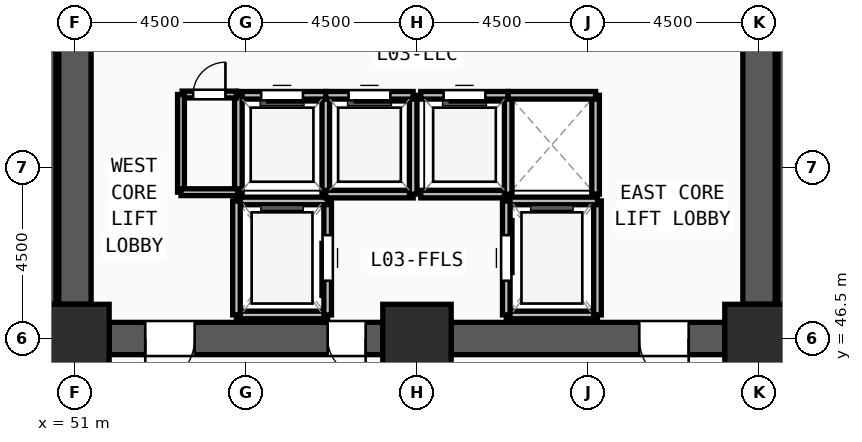
"""IFC4 building model, lengths in metres.
Left out: names, types, materials, properties, quantities, classifications, styles, units other than length and angle.
Written with IfcOpenShell. Run it as: python <this file> out.ifc"""

import sys

from ifc_helpers import new_model, si_unit, direction, frame, frame_2d, origin, origin_2d, place, context, subcontext, project, spatial, rectangle, extrude, source, transform, mapped, element, fill, save


model = new_model("IFC4")
c1 = context("Model", 3, precision=1e-05, world=origin(), true_north=direction((0.0, 1.0)))
c2 = subcontext(c1, "Body", "Model", "MODEL_VIEW")
j1 = project(units=[si_unit("LENGTHUNIT", "METRE"), si_unit("PLANEANGLEUNIT", "RADIAN")], contexts=[c1])
p1 = place(None, origin())
s1 = spatial("IfcSite", under=j1, at=p1, CompositionType="ELEMENT")
p2 = place(p1, origin())
s2 = spatial("IfcBuilding", under=s1, at=p2, CompositionType="ELEMENT")
p3 = place(p2, frame((0.0, 0.0, 9.9)))
s3 = spatial("IfcBuildingStorey", under=s2, at=p3, CompositionType="ELEMENT", Elevation=9.9)
m1 = source(origin(), c2, "Body", "SweptSolid", [
    extrude(rectangle(XDim=1.8, YDim=1.8, at=origin_2d()), origin(), (0.0, 0.0, 1.0), 4.5),
])
for number, where, z_axis, x_axis in (
    (1, (51.0, 46.5, 0.0), (0.0, 0.0, 1.0), (1.0, 0.0, 0.0)),
    (2, (60.0, 46.5, 0.0), (0.0, 0.0, 1.0), (1.0, 0.0, 0.0)),
    (3, (69.0, 46.5, 0.0), (0.0, 0.0, 1.0), (1.0, 0.0, 0.0)),
):
    element("IfcColumn", number, at=place(p3, frame(where, z_axis=z_axis, x_axis=x_axis)), inside=s3, PredefinedType="COLUMN", context=c2, shape_type="MappedRepresentation", body=[
        mapped(m1, transform((0.0, 0.0, 0.0), x_axis=(1.0, 0.0, 0.0), y_axis=(0.0, 1.0, 0.0), z_axis=(0.0, 0.0, 1.0), scale=1.0)),
    ])
p4 = place(p3, frame((69.0, 60.6, 0.0), z_axis=(0.0, 0.0, 1.0), x_axis=(0.0, -1.0, 0.0)))
e4 = element("IfcWall", 4, at=p4, inside=s3, PredefinedType="SHEAR", context=c2, shape_type="SweptSolid", body=[
    extrude(rectangle(XDim=13.2, YDim=0.85, at=frame_2d((6.6, 0.0))), origin(), (0.0, 0.0, 1.0), 4.25),
])
m2 = source(origin(), c2, "Body", "SweptSolid", [
    extrude(rectangle(XDim=1.2, YDim=2.2, at=frame_2d((0.6, 1.1))), frame((0.0, 0.435, 0.0), z_axis=(0.0, -1.0, 0.0), x_axis=(1.0, 0.0, 0.0)), (0.0, 0.0, 1.0), 0.87),
])
p5 = place(p4, frame((1.05, 0.0, 0.0)))
e5 = element("IfcOpeningElement", 5, at=p5, cuts=e4, PredefinedType="OPENING", context=c2, shape_type="MappedRepresentation", body=[
    mapped(m2, transform((0.0, 0.0, 0.0), x_axis=(1.0, 0.0, 0.0), y_axis=(0.0, 1.0, 0.0), z_axis=(0.0, 0.0, 1.0), scale=1.0)),
])
p6 = place(p3, frame((68.1, 46.5, 0.0), z_axis=(0.0, 0.0, 1.0), x_axis=(-1.0, 0.0, 0.0)))
e6 = element("IfcWall", 6, at=p6, inside=s3, PredefinedType="SHEAR", context=c2, shape_type="SweptSolid", body=[
    extrude(rectangle(XDim=7.2, YDim=0.85, at=frame_2d((3.6, 0.0))), origin(), (0.0, 0.0, 1.0), 4.25),
])
m3 = source(origin(), c2, "Body", "SweptSolid", [
    extrude(rectangle(XDim=1.3, YDim=2.2, at=frame_2d((0.65, 1.1))), frame((0.0, 0.435, 0.0), z_axis=(0.0, -1.0, 0.0), x_axis=(1.0, 0.0, 0.0)), (0.0, 0.0, 1.0), 0.87),
])
p7 = place(p6, frame((0.95, 0.0, 0.0)))
e7 = element("IfcOpeningElement", 7, at=p7, cuts=e6, PredefinedType="OPENING", context=c2, shape_type="MappedRepresentation", body=[
    mapped(m3, transform((0.0, 0.0, 0.0), x_axis=(1.0, 0.0, 0.0), y_axis=(0.0, 1.0, 0.0), z_axis=(0.0, 0.0, 1.0), scale=1.0)),
])
p8 = place(p3, frame((59.1, 46.5, 0.0), z_axis=(0.0, 0.0, 1.0), x_axis=(-1.0, 0.0, 0.0)))
e8 = element("IfcWall", 8, at=p8, inside=s3, PredefinedType="SHEAR", context=c2, shape_type="SweptSolid", body=[
    extrude(rectangle(XDim=7.2, YDim=0.85, at=frame_2d((3.6, 0.0))), origin(), (0.0, 0.0, 1.0), 4.25),
])
p9 = place(p8, frame((4.95, 0.0, 0.0)))
e9 = element("IfcOpeningElement", 9, at=p9, cuts=e8, PredefinedType="OPENING", context=c2, shape_type="MappedRepresentation", body=[
    mapped(m3, transform((0.0, 0.0, 0.0), x_axis=(1.0, 0.0, 0.0), y_axis=(0.0, 1.0, 0.0), z_axis=(0.0, 0.0, 1.0), scale=1.0)),
])
m4 = source(origin(), c2, "Body", "SweptSolid", [
    extrude(rectangle(XDim=1.0, YDim=2.2, at=frame_2d((0.5, 1.1))), frame((0.0, 0.435, 0.0), z_axis=(0.0, -1.0, 0.0), x_axis=(1.0, 0.0, 0.0)), (0.0, 0.0, 1.0), 0.87),
])
p10 = place(p8, frame((0.45, 0.0, 0.0)))
e10 = element("IfcOpeningElement", 10, at=p10, cuts=e8, PredefinedType="OPENING", context=c2, shape_type="MappedRepresentation", body=[
    mapped(m4, transform((0.0, 0.0, 0.0), x_axis=(1.0, 0.0, 0.0), y_axis=(0.0, 1.0, 0.0), z_axis=(0.0, 0.0, 1.0), scale=1.0)),
])
p11 = place(p3, frame((51.0, 47.4, 0.0), z_axis=(0.0, 0.0, 1.0), x_axis=(0.0, 1.0, 0.0)))
e11 = element("IfcWall", 11, at=p11, inside=s3, PredefinedType="SHEAR", context=c2, shape_type="SweptSolid", body=[
    extrude(rectangle(XDim=13.2, YDim=0.85, at=frame_2d((6.6, 0.0))), origin(), (0.0, 0.0, 1.0), 4.25),
])
for number, where, z_axis, x_axis in (
    (12, (50.38, 46.7, 0.0), (0.0, 0.0, 1.0), (0.0, 1.0, 0.0)),
    (13, (69.62, 54.52, 0.0), (0.0, 0.0, 1.0), (0.0, -1.0, 0.0)),
):
    element("IfcWall", number, at=place(p3, frame(where, z_axis=z_axis, x_axis=x_axis)), inside=s3, PredefinedType="SOLIDWALL", context=c2, shape_type="SweptSolid", body=[
        extrude(rectangle(XDim=7.82, YDim=0.24, at=frame_2d((3.91, 0.0))), origin(), (0.0, 0.0, 1.0), 4.25),
    ])
p12 = place(p3, frame((55.25, 47.12, 0.0), z_axis=(0.0, 0.0, 1.0), x_axis=(1.0, 0.0, 0.0)))
e14 = element("IfcWall", 14, at=p12, inside=s3, PredefinedType="SOLIDWALL", context=c2, shape_type="SweptSolid", body=[
    extrude(rectangle(XDim=2.4, YDim=0.2, at=frame_2d((1.2, 0.0))), origin(), (0.0, 0.0, 1.0), 4.25),
])
p13 = place(p3, frame((57.65, 47.12, 0.0), z_axis=(0.0, 0.0, 1.0), x_axis=(0.0, 1.0, 0.0)))
e15 = element("IfcWall", 15, at=p13, inside=s3, PredefinedType="SOLIDWALL", context=c2, shape_type="SweptSolid", body=[
    extrude(rectangle(XDim=3.0, YDim=0.2, at=frame_2d((1.5, 0.0))), origin(), (0.0, 0.0, 1.0), 4.25),
])
m5 = source(origin(), c2, "Body", "SweptSolid", [
    extrude(rectangle(XDim=1.2, YDim=2.3, at=frame_2d((0.6, 1.15))), frame((0.0, 0.11, 0.0), z_axis=(0.0, -1.0, 0.0), x_axis=(1.0, 0.0, 0.0)), (0.0, 0.0, 1.0), 0.22),
])
p14 = place(p13, frame((0.9, 0.0, 0.0)))
e16 = element("IfcOpeningElement", 16, at=p14, cuts=e15, PredefinedType="OPENING", context=c2, shape_type="MappedRepresentation", body=[
    mapped(m5, transform((0.0, 0.0, 0.0), x_axis=(1.0, 0.0, 0.0), y_axis=(0.0, 1.0, 0.0), z_axis=(0.0, 0.0, 1.0), scale=1.0)),
])
p15 = place(p3, frame((57.65, 50.12, 0.0), z_axis=(0.0, 0.0, 1.0), x_axis=(-1.0, 0.0, 0.0)))
e17 = element("IfcWall", 17, at=p15, inside=s3, PredefinedType="SOLIDWALL", context=c2, shape_type="SweptSolid", body=[
    extrude(rectangle(XDim=2.4, YDim=0.2, at=frame_2d((1.2, 0.0))), origin(), (0.0, 0.0, 1.0), 4.25),
])
p16 = place(p3, frame((55.25, 50.12, 0.0), z_axis=(0.0, 0.0, 1.0), x_axis=(0.0, -1.0, 0.0)))
e18 = element("IfcWall", 18, at=p16, inside=s3, PredefinedType="SOLIDWALL", context=c2, shape_type="SweptSolid", body=[
    extrude(rectangle(XDim=3.0, YDim=0.2, at=frame_2d((1.5, 0.0))), origin(), (0.0, 0.0, 1.0), 4.25),
])
p17 = place(p3, frame((62.35, 47.12, 0.0), z_axis=(0.0, 0.0, 1.0), x_axis=(1.0, 0.0, 0.0)))
e19 = element("IfcWall", 19, at=p17, inside=s3, PredefinedType="SOLIDWALL", context=c2, shape_type="SweptSolid", body=[
    extrude(rectangle(XDim=2.4, YDim=0.2, at=frame_2d((1.2, 0.0))), origin(), (0.0, 0.0, 1.0), 4.25),
])
p18 = place(p3, frame((64.75, 47.12, 0.0), z_axis=(0.0, 0.0, 1.0), x_axis=(0.0, 1.0, 0.0)))
e20 = element("IfcWall", 20, at=p18, inside=s3, PredefinedType="SOLIDWALL", context=c2, shape_type="SweptSolid", body=[
    extrude(rectangle(XDim=3.0, YDim=0.2, at=frame_2d((1.5, 0.0))), origin(), (0.0, 0.0, 1.0), 4.25),
])
p19 = place(p3, frame((64.75, 50.12, 0.0), z_axis=(0.0, 0.0, 1.0), x_axis=(-1.0, 0.0, 0.0)))
e21 = element("IfcWall", 21, at=p19, inside=s3, PredefinedType="SOLIDWALL", context=c2, shape_type="SweptSolid", body=[
    extrude(rectangle(XDim=2.4, YDim=0.2, at=frame_2d((1.2, 0.0))), origin(), (0.0, 0.0, 1.0), 4.25),
])
p20 = place(p3, frame((62.35, 50.12, 0.0), z_axis=(0.0, 0.0, 1.0), x_axis=(0.0, -1.0, 0.0)))
e22 = element("IfcWall", 22, at=p20, inside=s3, PredefinedType="SOLIDWALL", context=c2, shape_type="SweptSolid", body=[
    extrude(rectangle(XDim=3.0, YDim=0.2, at=frame_2d((1.5, 0.0))), origin(), (0.0, 0.0, 1.0), 4.25),
])
p21 = place(p20, frame((0.9, 0.0, 0.0)))
e23 = element("IfcOpeningElement", 23, at=p21, cuts=e22, PredefinedType="OPENING", context=c2, shape_type="MappedRepresentation", body=[
    mapped(m5, transform((0.0, 0.0, 0.0), x_axis=(1.0, 0.0, 0.0), y_axis=(0.0, 1.0, 0.0), z_axis=(0.0, 0.0, 1.0), scale=1.0)),
])
p22 = place(p3, frame((57.6, 50.3, 0.0), z_axis=(0.0, 0.0, 1.0), x_axis=(0.0, 1.0, 0.0)))
e24 = element("IfcWall", 24, at=p22, inside=s3, PredefinedType="SOLIDWALL", context=c2, shape_type="SweptSolid", body=[
    extrude(rectangle(XDim=2.6, YDim=0.2, at=frame_2d((1.3, 0.0))), origin(), (0.0, 0.0, 1.0), 4.25),
])
p23 = place(p3, frame((57.6, 52.9, 0.0), z_axis=(0.0, 0.0, 1.0), x_axis=(-1.0, 0.0, 0.0)))
e25 = element("IfcWall", 25, at=p23, inside=s3, PredefinedType="SOLIDWALL", context=c2, shape_type="SweptSolid", body=[
    extrude(rectangle(XDim=2.3, YDim=0.2, at=frame_2d((1.15, 0.0))), origin(), (0.0, 0.0, 1.0), 4.25),
])
m6 = source(origin(), c2, "Body", "SweptSolid", [
    extrude(rectangle(XDim=1.1, YDim=2.2, at=frame_2d((0.55, 1.1))), frame((0.0, 0.11, 0.0), z_axis=(0.0, -1.0, 0.0), x_axis=(1.0, 0.0, 0.0)), (0.0, 0.0, 1.0), 0.22),
])
p24 = place(p23, frame((0.6, 0.0, 0.0)))
e26 = element("IfcOpeningElement", 26, at=p24, cuts=e25, PredefinedType="OPENING", context=c2, shape_type="MappedRepresentation", body=[
    mapped(m6, transform((0.0, 0.0, 0.0), x_axis=(1.0, 0.0, 0.0), y_axis=(0.0, 1.0, 0.0), z_axis=(0.0, 0.0, 1.0), scale=1.0)),
])
p25 = place(p3, frame((55.3, 52.9, 0.0), z_axis=(0.0, 0.0, 1.0), x_axis=(0.0, -1.0, 0.0)))
e27 = element("IfcWall", 27, at=p25, inside=s3, PredefinedType="SOLIDWALL", context=c2, shape_type="SweptSolid", body=[
    extrude(rectangle(XDim=2.6, YDim=0.2, at=frame_2d((1.3, 0.0))), origin(), (0.0, 0.0, 1.0), 4.25),
])
p26 = place(p3, frame((57.6, 50.3, 0.0), z_axis=(0.0, 0.0, 1.0), x_axis=(1.0, 0.0, 0.0)))
e28 = element("IfcWall", 28, at=p26, inside=s3, PredefinedType="SOLIDWALL", context=c2, shape_type="SweptSolid", body=[
    extrude(rectangle(XDim=2.3, YDim=0.2, at=frame_2d((1.15, 0.0))), origin(), (0.0, 0.0, 1.0), 4.25),
])
p27 = place(p3, frame((59.9, 50.3, 0.0), z_axis=(0.0, 0.0, 1.0), x_axis=(0.0, 1.0, 0.0)))
e29 = element("IfcWall", 29, at=p27, inside=s3, PredefinedType="SOLIDWALL", context=c2, shape_type="SweptSolid", body=[
    extrude(rectangle(XDim=2.6, YDim=0.2, at=frame_2d((1.3, 0.0))), origin(), (0.0, 0.0, 1.0), 4.25),
])
p28 = place(p3, frame((59.9, 52.9, 0.0), z_axis=(0.0, 0.0, 1.0), x_axis=(-1.0, 0.0, 0.0)))
e30 = element("IfcWall", 30, at=p28, inside=s3, PredefinedType="SOLIDWALL", context=c2, shape_type="SweptSolid", body=[
    extrude(rectangle(XDim=2.3, YDim=0.2, at=frame_2d((1.15, 0.0))), origin(), (0.0, 0.0, 1.0), 4.25),
])
p29 = place(p28, frame((0.6, 0.0, 0.0)))
e31 = element("IfcOpeningElement", 31, at=p29, cuts=e30, PredefinedType="OPENING", context=c2, shape_type="MappedRepresentation", body=[
    mapped(m6, transform((0.0, 0.0, 0.0), x_axis=(1.0, 0.0, 0.0), y_axis=(0.0, 1.0, 0.0), z_axis=(0.0, 0.0, 1.0), scale=1.0)),
])
p30 = place(p3, frame((60.1, 50.3, 0.0), z_axis=(0.0, 0.0, 1.0), x_axis=(1.0, 0.0, 0.0)))
e32 = element("IfcWall", 32, at=p30, inside=s3, PredefinedType="SOLIDWALL", context=c2, shape_type="SweptSolid", body=[
    extrude(rectangle(XDim=2.3, YDim=0.2, at=frame_2d((1.15, 0.0))), origin(), (0.0, 0.0, 1.0), 4.25),
])
p31 = place(p3, frame((62.4, 50.3, 0.0), z_axis=(0.0, 0.0, 1.0), x_axis=(0.0, 1.0, 0.0)))
e33 = element("IfcWall", 33, at=p31, inside=s3, PredefinedType="SOLIDWALL", context=c2, shape_type="SweptSolid", body=[
    extrude(rectangle(XDim=2.6, YDim=0.2, at=frame_2d((1.3, 0.0))), origin(), (0.0, 0.0, 1.0), 4.25),
])
p32 = place(p3, frame((62.4, 52.9, 0.0), z_axis=(0.0, 0.0, 1.0), x_axis=(-1.0, 0.0, 0.0)))
e34 = element("IfcWall", 34, at=p32, inside=s3, PredefinedType="SOLIDWALL", context=c2, shape_type="SweptSolid", body=[
    extrude(rectangle(XDim=2.3, YDim=0.2, at=frame_2d((1.15, 0.0))), origin(), (0.0, 0.0, 1.0), 4.25),
])
p33 = place(p32, frame((0.6, 0.0, 0.0)))
e35 = element("IfcOpeningElement", 35, at=p33, cuts=e34, PredefinedType="OPENING", context=c2, shape_type="MappedRepresentation", body=[
    mapped(m6, transform((0.0, 0.0, 0.0), x_axis=(1.0, 0.0, 0.0), y_axis=(0.0, 1.0, 0.0), z_axis=(0.0, 0.0, 1.0), scale=1.0)),
])
p34 = place(p3, frame((64.7, 50.3, 0.0), z_axis=(0.0, 0.0, 1.0), x_axis=(0.0, 1.0, 0.0)))
e36 = element("IfcWall", 36, at=p34, inside=s3, PredefinedType="SOLIDWALL", context=c2, shape_type="SweptSolid", body=[
    extrude(rectangle(XDim=2.6, YDim=0.2, at=frame_2d((1.3, 0.0))), origin(), (0.0, 0.0, 1.0), 4.25),
])
p35 = place(p3, frame((64.7, 52.9, 0.0), z_axis=(0.0, 0.0, 1.0), x_axis=(-1.0, 0.0, 0.0)))
e37 = element("IfcWall", 37, at=p35, inside=s3, PredefinedType="SOLIDWALL", context=c2, shape_type="SweptSolid", body=[
    extrude(rectangle(XDim=2.3, YDim=0.2, at=frame_2d((1.15, 0.0))), origin(), (0.0, 0.0, 1.0), 4.25),
])
p36 = place(p3, frame((53.82, 52.92, 0.0), z_axis=(0.0, 0.0, 1.0), x_axis=(1.0, 0.0, 0.0)))
e38 = element("IfcWall", 38, at=p36, inside=s3, PredefinedType="PARTITIONING", context=c2, shape_type="SweptSolid", body=[
    extrude(rectangle(XDim=1.43, YDim=0.18, at=frame_2d((0.715, 0.0))), origin(), (0.0, 0.0, 1.0), 4.25),
])
m7 = source(origin(), c2, "Body", "SweptSolid", [
    extrude(rectangle(XDim=0.85, YDim=2.1, at=frame_2d((0.425, 1.05))), frame((0.0, 0.1, 0.0), z_axis=(0.0, -1.0, 0.0), x_axis=(1.0, 0.0, 0.0)), (0.0, 0.0, 1.0), 0.2),
])
p37 = place(p36, frame((0.29, 0.0, 0.0)))
e39 = element("IfcOpeningElement", 39, at=p37, cuts=e38, PredefinedType="OPENING", context=c2, shape_type="MappedRepresentation", body=[
    mapped(m7, transform((0.0, 0.0, 0.0), x_axis=(1.0, 0.0, 0.0), y_axis=(0.0, 1.0, 0.0), z_axis=(0.0, 0.0, 1.0), scale=1.0)),
])
p38 = place(p3, frame((53.79, 50.35, 0.0), z_axis=(0.0, 0.0, 1.0), x_axis=(0.0, 1.0, 0.0)))
e40 = element("IfcWall", 40, at=p38, inside=s3, PredefinedType="PARTITIONING", context=c2, shape_type="SweptSolid", body=[
    extrude(rectangle(XDim=2.57, YDim=0.18, at=frame_2d((1.285, 0.0))), origin(), (0.0, 0.0, 1.0), 4.25),
])
p39 = place(p3, frame((53.79, 50.35, 0.0), z_axis=(0.0, 0.0, 1.0), x_axis=(1.0, 0.0, 0.0)))
e41 = element("IfcWall", 41, at=p39, inside=s3, PredefinedType="PARTITIONING", context=c2, shape_type="SweptSolid", body=[
    extrude(rectangle(XDim=1.49, YDim=0.18, at=frame_2d((0.745, 0.0))), origin(), (0.0, 0.0, 1.0), 4.25),
])
m8 = source(origin(), c2, "Body", "SweptSolid", [
    extrude(rectangle(XDim=1.3, YDim=2.2, at=frame_2d((0.65, 1.1))), frame((0.0, 0.025, 0.0), z_axis=(0.0, -1.0, 0.0), x_axis=(1.0, 0.0, 0.0)), (0.0, 0.0, 1.0), 0.05),
])
p40 = place(p9, origin())
e42 = element("IfcDoor", 42, at=p40, inside=s3, OperationType="SINGLE_SWING_RIGHT", PredefinedType="DOOR", context=c2, shape_type="MappedRepresentation", body=[
    mapped(m8, transform((0.0, 0.0, 0.0), x_axis=(1.0, 0.0, 0.0), y_axis=(0.0, 1.0, 0.0), z_axis=(0.0, 0.0, 1.0), scale=1.0)),
])
fill(e9, e42)
m9 = source(origin(), c2, "Body", "SweptSolid", [
    extrude(rectangle(XDim=1.0, YDim=2.2, at=frame_2d((0.5, 1.1))), frame((0.0, 0.025, 0.0), z_axis=(0.0, -1.0, 0.0), x_axis=(1.0, 0.0, 0.0)), (0.0, 0.0, 1.0), 0.05),
])
p41 = place(p10, origin())
e43 = element("IfcDoor", 43, at=p41, inside=s3, OperationType="SINGLE_SWING_LEFT", PredefinedType="DOOR", context=c2, shape_type="MappedRepresentation", body=[
    mapped(m9, transform((0.0, 0.0, 0.0), x_axis=(1.0, 0.0, 0.0), y_axis=(0.0, 1.0, 0.0), z_axis=(0.0, 0.0, 1.0), scale=1.0)),
])
fill(e10, e43)
p42 = place(p7, origin())
e44 = element("IfcDoor", 44, at=p42, inside=s3, OperationType="SINGLE_SWING_LEFT", PredefinedType="DOOR", context=c2, shape_type="MappedRepresentation", body=[
    mapped(m8, transform((0.0, 0.0, 0.0), x_axis=(1.0, 0.0, 0.0), y_axis=(0.0, 1.0, 0.0), z_axis=(0.0, 0.0, 1.0), scale=1.0)),
])
fill(e7, e44)
m10 = source(origin(), c2, "Body", "SweptSolid", [
    extrude(rectangle(XDim=1.2, YDim=2.3, at=frame_2d((0.6, 1.15))), frame((0.0, 0.025, 0.0), z_axis=(0.0, -1.0, 0.0), x_axis=(1.0, 0.0, 0.0)), (0.0, 0.0, 1.0), 0.05),
])
p43 = place(p14, origin())
e45 = element("IfcDoor", 45, at=p43, inside=s3, OperationType="SLIDING_TO_LEFT", PredefinedType="DOOR", context=c2, shape_type="MappedRepresentation", body=[
    mapped(m10, transform((0.0, 0.0, 0.0), x_axis=(1.0, 0.0, 0.0), y_axis=(0.0, 1.0, 0.0), z_axis=(0.0, 0.0, 1.0), scale=1.0)),
])
fill(e16, e45)
p44 = place(p21, origin())
e46 = element("IfcDoor", 46, at=p44, inside=s3, OperationType="SLIDING_TO_LEFT", PredefinedType="DOOR", context=c2, shape_type="MappedRepresentation", body=[
    mapped(m10, transform((0.0, 0.0, 0.0), x_axis=(1.0, 0.0, 0.0), y_axis=(0.0, 1.0, 0.0), z_axis=(0.0, 0.0, 1.0), scale=1.0)),
])
fill(e23, e46)
m11 = source(origin(), c2, "Body", "SweptSolid", [
    extrude(rectangle(XDim=1.1, YDim=2.2, at=frame_2d((0.55, 1.1))), frame((0.0, 0.025, 0.0), z_axis=(0.0, -1.0, 0.0), x_axis=(1.0, 0.0, 0.0)), (0.0, 0.0, 1.0), 0.05),
])
p45 = place(p24, origin())
e47 = element("IfcDoor", 47, at=p45, inside=s3, OperationType="SLIDING_TO_LEFT", PredefinedType="DOOR", context=c2, shape_type="MappedRepresentation", body=[
    mapped(m11, transform((0.0, 0.0, 0.0), x_axis=(1.0, 0.0, 0.0), y_axis=(0.0, 1.0, 0.0), z_axis=(0.0, 0.0, 1.0), scale=1.0)),
])
fill(e26, e47)
p46 = place(p29, origin())
e48 = element("IfcDoor", 48, at=p46, inside=s3, OperationType="SLIDING_TO_LEFT", PredefinedType="DOOR", context=c2, shape_type="MappedRepresentation", body=[
    mapped(m11, transform((0.0, 0.0, 0.0), x_axis=(1.0, 0.0, 0.0), y_axis=(0.0, 1.0, 0.0), z_axis=(0.0, 0.0, 1.0), scale=1.0)),
])
fill(e31, e48)
p47 = place(p33, origin())
e49 = element("IfcDoor", 49, at=p47, inside=s3, OperationType="SLIDING_TO_LEFT", PredefinedType="DOOR", context=c2, shape_type="MappedRepresentation", body=[
    mapped(m11, transform((0.0, 0.0, 0.0), x_axis=(1.0, 0.0, 0.0), y_axis=(0.0, 1.0, 0.0), z_axis=(0.0, 0.0, 1.0), scale=1.0)),
])
fill(e35, e49)
m12 = source(origin(), c2, "Body", "SweptSolid", [
    extrude(rectangle(XDim=0.85, YDim=2.1, at=frame_2d((0.425, 1.05))), frame((0.0, 0.025, 0.0), z_axis=(0.0, -1.0, 0.0), x_axis=(1.0, 0.0, 0.0)), (0.0, 0.0, 1.0), 0.05),
])
p48 = place(p37, origin())
e50 = element("IfcDoor", 50, at=p48, inside=s3, OperationType="SINGLE_SWING_RIGHT", PredefinedType="DOOR", context=c2, shape_type="MappedRepresentation", body=[
    mapped(m12, transform((0.0, 0.0, 0.0), x_axis=(1.0, 0.0, 0.0), y_axis=(0.0, 1.0, 0.0), z_axis=(0.0, 0.0, 1.0), scale=1.0)),
])
fill(e39, e50)
save(model, sys.argv[1])
